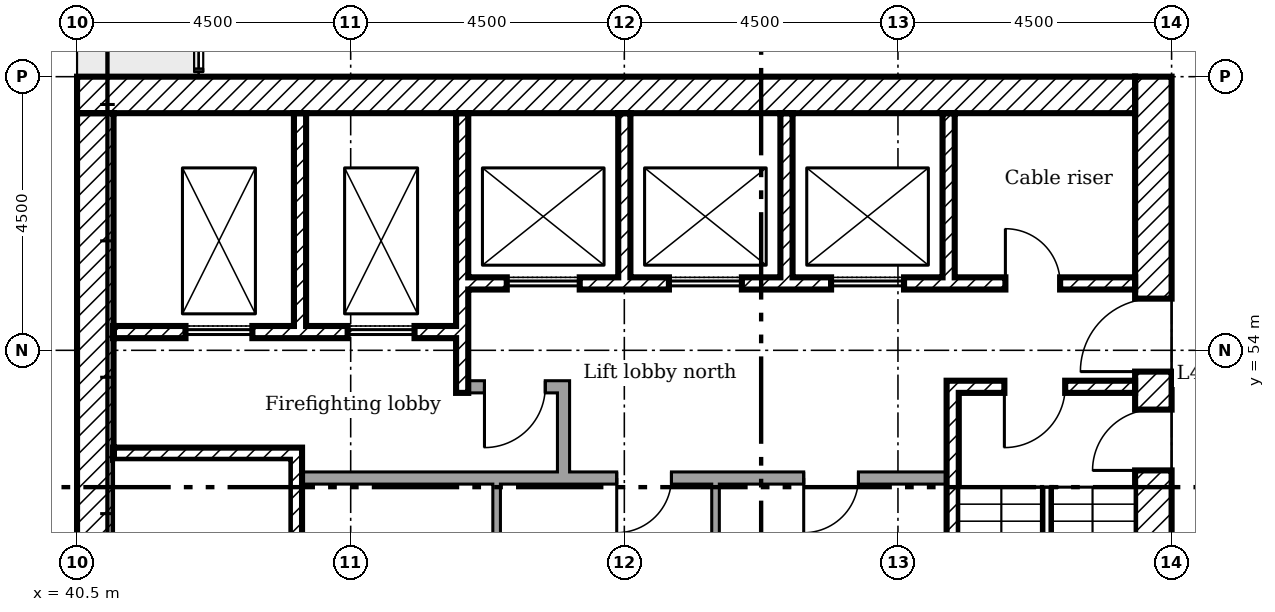
"""IFC4 building model, lengths in metres.
Left out: names, types, materials, properties, quantities, classifications, styles, units other than length and angle.
Written with IfcOpenShell. Run it as: python <this file> out.ifc"""

import sys

from ifc_helpers import new_model, si_unit, direction, frame, frame_2d, origin, place, context, subcontext, project, spatial, rectangle, extrude, element, fill, save


model = new_model("IFC4")
c1 = context("Model", 3, precision=1e-05, world=origin(), true_north=direction((0.0, 1.0)))
c2 = subcontext(c1, "Body", "Model", "MODEL_VIEW")
j1 = project(units=[si_unit("LENGTHUNIT", "METRE"), si_unit("PLANEANGLEUNIT", "RADIAN")], contexts=[c1])
p1 = place(None, origin())
s1 = spatial("IfcSite", under=j1, at=p1, CompositionType="ELEMENT")
p2 = place(p1, origin())
s2 = spatial("IfcBuilding", under=s1, at=p2, CompositionType="ELEMENT")
p3 = place(p2, frame((0.0, 0.0, 161.8)))
s3 = spatial("IfcBuildingStorey", under=s2, at=p3, CompositionType="ELEMENT", Elevation=161.8)
p4 = place(p3, frame((58.2, 40.5, 0.0), z_axis=(0.0, 0.0, 1.0), x_axis=(0.0, 1.0, 0.0)))
e1 = element("IfcWall", 1, at=p4, inside=s3, PredefinedType="SHEAR", context=c2, shape_type="SweptSolid", body=[
    extrude(rectangle(XDim=18.0, YDim=0.6, at=frame_2d((9.0, 0.0))), origin(), (0.0, 0.0, 1.0), 3.35),
])
p5 = place(p4, frame((13.15, 0.0, 0.0)))
e2 = element("IfcOpeningElement", 2, at=p5, cuts=e1, PredefinedType="OPENING", context=c2, shape_type="SweptSolid", body=[
    extrude(rectangle(XDim=1.2, YDim=2.1, at=frame_2d((0.6, 1.05))), frame((0.0, 0.31, 0.0), z_axis=(0.0, -1.0, 0.0), x_axis=(1.0, 0.0, 0.0)), (0.0, 0.0, 1.0), 0.62),
])
p6 = place(p4, frame((3.9, 0.0, 0.0)))
e3 = element("IfcOpeningElement", 3, at=p6, cuts=e1, PredefinedType="OPENING", context=c2, shape_type="SweptSolid", body=[
    extrude(rectangle(XDim=1.8, YDim=2.1, at=frame_2d((0.9, 1.05))), frame((0.0, 0.31, 0.0), z_axis=(0.0, -1.0, 0.0), x_axis=(1.0, 0.0, 0.0)), (0.0, 0.0, 1.0), 0.62),
])
p7 = place(p4, frame((11.525, 0.0, 0.0)))
e4 = element("IfcOpeningElement", 4, at=p7, cuts=e1, PredefinedType="OPENING", context=c2, shape_type="SweptSolid", body=[
    extrude(rectangle(XDim=1.0, YDim=2.1, at=frame_2d((0.5, 1.05))), frame((0.0, 0.31, 0.0), z_axis=(0.0, -1.0, 0.0), x_axis=(1.0, 0.0, 0.0)), (0.0, 0.0, 1.0), 0.62),
])
p8 = place(p3, frame((40.5, 58.2, 0.0)))
e5 = element("IfcWall", 5, at=p8, inside=s3, PredefinedType="SHEAR", context=c2, shape_type="SweptSolid", body=[
    extrude(rectangle(XDim=17.4, YDim=0.6, at=frame_2d((8.7, 0.0))), origin(), (0.0, 0.0, 1.0), 3.35),
])
p9 = place(p3, frame((40.8, 41.1, 0.0), z_axis=(0.0, 0.0, 1.0), x_axis=(0.0, 1.0, 0.0)))
e6 = element("IfcWall", 6, at=p9, inside=s3, PredefinedType="SHEAR", context=c2, shape_type="SweptSolid", body=[
    extrude(rectangle(XDim=16.8, YDim=0.6, at=frame_2d((8.4, 0.0))), origin(), (0.0, 0.0, 1.0), 3.35),
])
p10 = place(p3, frame((44.167, 57.9, 0.0), z_axis=(0.0, 0.0, 1.0), x_axis=(0.0, -1.0, 0.0)))
e7 = element("IfcWall", 7, at=p10, inside=s3, PredefinedType="SHEAR", context=c2, shape_type="SweptSolid", body=[
    extrude(rectangle(XDim=3.5, YDim=0.2, at=frame_2d((1.75, 0.0))), origin(), (0.0, 0.0, 1.0), 3.35),
])
p11 = place(p3, frame((46.833, 57.9, 0.0), z_axis=(0.0, 0.0, 1.0), x_axis=(0.0, -1.0, 0.0)))
e8 = element("IfcWall", 8, at=p11, inside=s3, PredefinedType="SHEAR", context=c2, shape_type="SweptSolid", body=[
    extrude(rectangle(XDim=4.6, YDim=0.2, at=frame_2d((2.3, 0.0))), origin(), (0.0, 0.0, 1.0), 3.35),
])
for number, where, z_axis, x_axis in (
    (9, (49.5, 57.9, 0.0), (0.0, 0.0, 1.0), (0.0, -1.0, 0.0)),
    (10, (52.167, 57.9, 0.0), (0.0, 0.0, 1.0), (0.0, -1.0, 0.0)),
    (11, (54.833, 57.9, 0.0), (0.0, 0.0, 1.0), (0.0, -1.0, 0.0)),
):
    element("IfcWall", number, at=place(p3, frame(where, z_axis=z_axis, x_axis=x_axis)), inside=s3, PredefinedType="SHEAR", context=c2, shape_type="SweptSolid", body=[
        extrude(rectangle(XDim=2.7, YDim=0.2, at=frame_2d((1.35, 0.0))), origin(), (0.0, 0.0, 1.0), 3.35),
    ])
p12 = place(p3, frame((48.5, 51.9, 0.0), z_axis=(0.0, 0.0, 1.0), x_axis=(0.0, 1.0, 0.0)))
e12 = element("IfcWall", 12, at=p12, inside=s3, PredefinedType="PARTITIONING", context=c2, shape_type="SweptSolid", body=[
    extrude(rectangle(XDim=1.6, YDim=0.2, at=frame_2d((0.8, 0.0))), origin(), (0.0, 0.0, 1.0), 3.35),
])
p13 = place(p3, frame((46.933, 53.4, 0.0)))
e13 = element("IfcWall", 13, at=p13, inside=s3, PredefinedType="PARTITIONING", context=c2, shape_type="SweptSolid", body=[
    extrude(rectangle(XDim=1.467, YDim=0.2, at=frame_2d((0.733, 0.0))), origin(), (0.0, 0.0, 1.0), 3.35),
])
p14 = place(p13, frame((0.267, 0.0, 0.0)))
e14 = element("IfcOpeningElement", 14, at=p14, cuts=e13, PredefinedType="OPENING", context=c2, shape_type="SweptSolid", body=[
    extrude(rectangle(XDim=1.0, YDim=2.1, at=frame_2d((0.5, 1.05))), frame((0.0, 0.11, 0.0), z_axis=(0.0, -1.0, 0.0), x_axis=(1.0, 0.0, 0.0)), (0.0, 0.0, 1.0), 0.22),
])
p15 = place(p3, frame((46.933, 55.1, 0.0)))
e15 = element("IfcWall", 15, at=p15, inside=s3, PredefinedType="SHEAR", context=c2, shape_type="SweptSolid", body=[
    extrude(rectangle(XDim=10.967, YDim=0.2, at=frame_2d((5.483, 0.0))), origin(), (0.0, 0.0, 1.0), 3.35),
])
p16 = place(p15, frame((8.833, 0.0, 0.0)))
e16 = element("IfcOpeningElement", 16, at=p16, cuts=e15, PredefinedType="OPENING", context=c2, shape_type="SweptSolid", body=[
    extrude(rectangle(XDim=0.9, YDim=2.1, at=frame_2d((0.45, 1.05))), frame((0.0, 0.11, 0.0), z_axis=(0.0, -1.0, 0.0), x_axis=(1.0, 0.0, 0.0)), (0.0, 0.0, 1.0), 0.22),
])
p17 = place(p15, frame((0.633, 0.0, 0.0)))
e17 = element("IfcOpeningElement", 17, at=p17, cuts=e15, PredefinedType="OPENING", context=c2, shape_type="SweptSolid", body=[
    extrude(rectangle(XDim=1.2, YDim=2.1, at=frame_2d((0.6, 1.05))), frame((0.0, 0.11, 0.0), z_axis=(0.0, -1.0, 0.0), x_axis=(1.0, 0.0, 0.0)), (0.0, 0.0, 1.0), 0.22),
])
p18 = place(p15, frame((3.3, 0.0, 0.0)))
e18 = element("IfcOpeningElement", 18, at=p18, cuts=e15, PredefinedType="OPENING", context=c2, shape_type="SweptSolid", body=[
    extrude(rectangle(XDim=1.2, YDim=2.1, at=frame_2d((0.6, 1.05))), frame((0.0, 0.11, 0.0), z_axis=(0.0, -1.0, 0.0), x_axis=(1.0, 0.0, 0.0)), (0.0, 0.0, 1.0), 0.22),
])
p19 = place(p15, frame((5.967, 0.0, 0.0)))
e19 = element("IfcOpeningElement", 19, at=p19, cuts=e15, PredefinedType="OPENING", context=c2, shape_type="SweptSolid", body=[
    extrude(rectangle(XDim=1.2, YDim=2.1, at=frame_2d((0.6, 1.05))), frame((0.0, 0.11, 0.0), z_axis=(0.0, -1.0, 0.0), x_axis=(1.0, 0.0, 0.0)), (0.0, 0.0, 1.0), 0.22),
])
p20 = place(p3, frame((41.1, 54.3, 0.0)))
e20 = element("IfcWall", 20, at=p20, inside=s3, PredefinedType="SHEAR", context=c2, shape_type="SweptSolid", body=[
    extrude(rectangle(XDim=5.633, YDim=0.2, at=frame_2d((2.817, 0.0))), origin(), (0.0, 0.0, 1.0), 3.35),
])
p21 = place(p20, frame((1.183, 0.0, 0.0)))
e21 = element("IfcOpeningElement", 21, at=p21, cuts=e20, PredefinedType="OPENING", context=c2, shape_type="SweptSolid", body=[
    extrude(rectangle(XDim=1.1, YDim=2.1, at=frame_2d((0.55, 1.05))), frame((0.0, 0.11, 0.0), z_axis=(0.0, -1.0, 0.0), x_axis=(1.0, 0.0, 0.0)), (0.0, 0.0, 1.0), 0.22),
])
p22 = place(p20, frame((3.85, 0.0, 0.0)))
e22 = element("IfcOpeningElement", 22, at=p22, cuts=e20, PredefinedType="OPENING", context=c2, shape_type="SweptSolid", body=[
    extrude(rectangle(XDim=1.1, YDim=2.1, at=frame_2d((0.55, 1.05))), frame((0.0, 0.11, 0.0), z_axis=(0.0, -1.0, 0.0), x_axis=(1.0, 0.0, 0.0)), (0.0, 0.0, 1.0), 0.22),
])
p23 = place(p3, frame((44.1, 45.5, 0.0), z_axis=(0.0, 0.0, 1.0), x_axis=(0.0, 1.0, 0.0)))
e23 = element("IfcWall", 23, at=p23, inside=s3, PredefinedType="SHEAR", context=c2, shape_type="SweptSolid", body=[
    extrude(rectangle(XDim=6.9, YDim=0.2, at=frame_2d((3.45, 0.0))), origin(), (0.0, 0.0, 1.0), 3.35),
])
p24 = place(p3, frame((41.1, 52.3, 0.0)))
e24 = element("IfcWall", 24, at=p24, inside=s3, PredefinedType="SHEAR", context=c2, shape_type="SweptSolid", body=[
    extrude(rectangle(XDim=2.9, YDim=0.2, at=frame_2d((1.45, 0.0))), origin(), (0.0, 0.0, 1.0), 3.35),
])
p25 = place(p3, frame((54.8, 53.4, 0.0)))
e25 = element("IfcWall", 25, at=p25, inside=s3, PredefinedType="SHEAR", context=c2, shape_type="SweptSolid", body=[
    extrude(rectangle(XDim=3.1, YDim=0.2, at=frame_2d((1.55, 0.0))), origin(), (0.0, 0.0, 1.0), 3.35),
])
p26 = place(p25, frame((0.95, 0.0, 0.0)))
e26 = element("IfcOpeningElement", 26, at=p26, cuts=e25, PredefinedType="OPENING", context=c2, shape_type="SweptSolid", body=[
    extrude(rectangle(XDim=1.0, YDim=2.1, at=frame_2d((0.5, 1.05))), frame((0.0, 0.11, 0.0), z_axis=(0.0, -1.0, 0.0), x_axis=(1.0, 0.0, 0.0)), (0.0, 0.0, 1.0), 0.22),
])
p27 = place(p3, frame((54.9, 46.8, 0.0), z_axis=(0.0, 0.0, 1.0), x_axis=(0.0, 1.0, 0.0)))
e27 = element("IfcWall", 27, at=p27, inside=s3, PredefinedType="SHEAR", context=c2, shape_type="SweptSolid", body=[
    extrude(rectangle(XDim=6.5, YDim=0.2, at=frame_2d((3.25, 0.0))), origin(), (0.0, 0.0, 1.0), 3.35),
])
p28 = place(p3, frame((44.2, 51.9, 0.0)))
e28 = element("IfcWall", 28, at=p28, inside=s3, PredefinedType="PARTITIONING", context=c2, shape_type="SweptSolid", body=[
    extrude(rectangle(XDim=10.6, YDim=0.2, at=frame_2d((5.3, 0.0))), origin(), (0.0, 0.0, 1.0), 3.35),
])
p29 = place(p28, frame((5.175, 0.0, 0.0)))
e29 = element("IfcOpeningElement", 29, at=p29, cuts=e28, PredefinedType="OPENING", context=c2, shape_type="SweptSolid", body=[
    extrude(rectangle(XDim=0.9, YDim=2.1, at=frame_2d((0.45, 1.05))), frame((0.0, 0.11, 0.0), z_axis=(0.0, -1.0, 0.0), x_axis=(1.0, 0.0, 0.0)), (0.0, 0.0, 1.0), 0.22),
])
p30 = place(p28, frame((8.25, 0.0, 0.0)))
e30 = element("IfcOpeningElement", 30, at=p30, cuts=e28, PredefinedType="OPENING", context=c2, shape_type="SweptSolid", body=[
    extrude(rectangle(XDim=0.9, YDim=2.1, at=frame_2d((0.45, 1.05))), frame((0.0, 0.11, 0.0), z_axis=(0.0, -1.0, 0.0), x_axis=(1.0, 0.0, 0.0)), (0.0, 0.0, 1.0), 0.22),
])
p31 = place(p3, frame((47.4, 46.8, 0.0), z_axis=(0.0, 0.0, 1.0), x_axis=(0.0, 1.0, 0.0)))
e31 = element("IfcWall", 31, at=p31, inside=s3, PredefinedType="PARTITIONING", context=c2, shape_type="SweptSolid", body=[
    extrude(rectangle(XDim=5.0, YDim=0.125, at=frame_2d((2.5, 0.0))), origin(), (0.0, 0.0, 1.0), 3.35),
])
p32 = place(p3, frame((51.0, 49.0, 0.0), z_axis=(0.0, 0.0, 1.0), x_axis=(0.0, 1.0, 0.0)))
e32 = element("IfcWall", 32, at=p32, inside=s3, PredefinedType="PARTITIONING", context=c2, shape_type="SweptSolid", body=[
    extrude(rectangle(XDim=2.8, YDim=0.125, at=frame_2d((1.4, 0.0))), origin(), (0.0, 0.0, 1.0), 3.35),
])
p33 = place(p5, origin())
e33 = element("IfcDoor", 33, at=p33, inside=s3, OperationType="SINGLE_SWING_RIGHT", PredefinedType="DOOR", context=c2, shape_type="SweptSolid", body=[
    extrude(rectangle(XDim=1.2, YDim=2.1, at=frame_2d((0.6, 1.05))), frame((0.0, 0.025, 0.0), z_axis=(0.0, -1.0, 0.0), x_axis=(1.0, 0.0, 0.0)), (0.0, 0.0, 1.0), 0.05),
])
fill(e2, e33)
p34 = place(p26, frame((1.0, 0.0, 0.0), x_axis=(-1.0, 0.0, 0.0)))
e34 = element("IfcDoor", 34, at=p34, inside=s3, OperationType="SINGLE_SWING_LEFT", PredefinedType="DOOR", context=c2, shape_type="SweptSolid", body=[
    extrude(rectangle(XDim=1.0, YDim=2.1, at=frame_2d((0.5, 1.05))), frame((0.0, 0.025, 0.0), z_axis=(0.0, -1.0, 0.0), x_axis=(1.0, 0.0, 0.0)), (0.0, 0.0, 1.0), 0.05),
])
fill(e26, e34)
p35 = place(p7, origin())
e35 = element("IfcDoor", 35, at=p35, inside=s3, OperationType="SINGLE_SWING_RIGHT", PredefinedType="DOOR", context=c2, shape_type="SweptSolid", body=[
    extrude(rectangle(XDim=1.0, YDim=2.1, at=frame_2d((0.5, 1.05))), frame((0.0, 0.025, 0.0), z_axis=(0.0, -1.0, 0.0), x_axis=(1.0, 0.0, 0.0)), (0.0, 0.0, 1.0), 0.05),
])
fill(e4, e35)
p36 = place(p14, frame((1.0, 0.0, 0.0), x_axis=(-1.0, 0.0, 0.0)))
e36 = element("IfcDoor", 36, at=p36, inside=s3, OperationType="SINGLE_SWING_LEFT", PredefinedType="DOOR", context=c2, shape_type="SweptSolid", body=[
    extrude(rectangle(XDim=1.0, YDim=2.1, at=frame_2d((0.5, 1.05))), frame((0.0, 0.025, 0.0), z_axis=(0.0, -1.0, 0.0), x_axis=(1.0, 0.0, 0.0)), (0.0, 0.0, 1.0), 0.05),
])
fill(e14, e36)
p37 = place(p16, origin())
e37 = element("IfcDoor", 37, at=p37, inside=s3, OperationType="SINGLE_SWING_RIGHT", PredefinedType="DOOR", context=c2, shape_type="SweptSolid", body=[
    extrude(rectangle(XDim=0.9, YDim=2.1, at=frame_2d((0.45, 1.05))), frame((0.0, 0.025, 0.0), z_axis=(0.0, -1.0, 0.0), x_axis=(1.0, 0.0, 0.0)), (0.0, 0.0, 1.0), 0.05),
])
fill(e16, e37)
p38 = place(p29, frame((0.9, 0.0, 0.0), x_axis=(-1.0, 0.0, 0.0)))
e38 = element("IfcDoor", 38, at=p38, inside=s3, OperationType="SINGLE_SWING_LEFT", PredefinedType="DOOR", context=c2, shape_type="SweptSolid", body=[
    extrude(rectangle(XDim=0.9, YDim=2.1, at=frame_2d((0.45, 1.05))), frame((0.0, 0.025, 0.0), z_axis=(0.0, -1.0, 0.0), x_axis=(1.0, 0.0, 0.0)), (0.0, 0.0, 1.0), 0.05),
])
fill(e29, e38)
p39 = place(p30, frame((0.9, 0.0, 0.0), x_axis=(-1.0, 0.0, 0.0)))
e39 = element("IfcDoor", 39, at=p39, inside=s3, OperationType="SINGLE_SWING_LEFT", PredefinedType="DOOR", context=c2, shape_type="SweptSolid", body=[
    extrude(rectangle(XDim=0.9, YDim=2.1, at=frame_2d((0.45, 1.05))), frame((0.0, 0.025, 0.0), z_axis=(0.0, -1.0, 0.0), x_axis=(1.0, 0.0, 0.0)), (0.0, 0.0, 1.0), 0.05),
])
fill(e30, e39)
p40 = place(p21, origin())
e40 = element("IfcDoor", 40, at=p40, inside=s3, OperationType="SLIDING_TO_LEFT", PredefinedType="DOOR", context=c2, shape_type="SweptSolid", body=[
    extrude(rectangle(XDim=1.1, YDim=2.1, at=frame_2d((0.55, 1.05))), frame((0.0, 0.025, 0.0), z_axis=(0.0, -1.0, 0.0), x_axis=(1.0, 0.0, 0.0)), (0.0, 0.0, 1.0), 0.05),
])
fill(e21, e40)
p41 = place(p22, origin())
e41 = element("IfcDoor", 41, at=p41, inside=s3, OperationType="SLIDING_TO_LEFT", PredefinedType="DOOR", context=c2, shape_type="SweptSolid", body=[
    extrude(rectangle(XDim=1.1, YDim=2.1, at=frame_2d((0.55, 1.05))), frame((0.0, 0.025, 0.0), z_axis=(0.0, -1.0, 0.0), x_axis=(1.0, 0.0, 0.0)), (0.0, 0.0, 1.0), 0.05),
])
fill(e22, e41)
p42 = place(p17, origin())
e42 = element("IfcDoor", 42, at=p42, inside=s3, OperationType="SLIDING_TO_LEFT", PredefinedType="DOOR", context=c2, shape_type="SweptSolid", body=[
    extrude(rectangle(XDim=1.2, YDim=2.1, at=frame_2d((0.6, 1.05))), frame((0.0, 0.025, 0.0), z_axis=(0.0, -1.0, 0.0), x_axis=(1.0, 0.0, 0.0)), (0.0, 0.0, 1.0), 0.05),
])
fill(e17, e42)
p43 = place(p18, origin())
e43 = element("IfcDoor", 43, at=p43, inside=s3, OperationType="SLIDING_TO_LEFT", PredefinedType="DOOR", context=c2, shape_type="SweptSolid", body=[
    extrude(rectangle(XDim=1.2, YDim=2.1, at=frame_2d((0.6, 1.05))), frame((0.0, 0.025, 0.0), z_axis=(0.0, -1.0, 0.0), x_axis=(1.0, 0.0, 0.0)), (0.0, 0.0, 1.0), 0.05),
])
fill(e18, e43)
p44 = place(p19, origin())
e44 = element("IfcDoor", 44, at=p44, inside=s3, OperationType="SLIDING_TO_LEFT", PredefinedType="DOOR", context=c2, shape_type="SweptSolid", body=[
    extrude(rectangle(XDim=1.2, YDim=2.1, at=frame_2d((0.6, 1.05))), frame((0.0, 0.025, 0.0), z_axis=(0.0, -1.0, 0.0), x_axis=(1.0, 0.0, 0.0)), (0.0, 0.0, 1.0), 0.05),
])
fill(e19, e44)
save(model, sys.argv[1])
